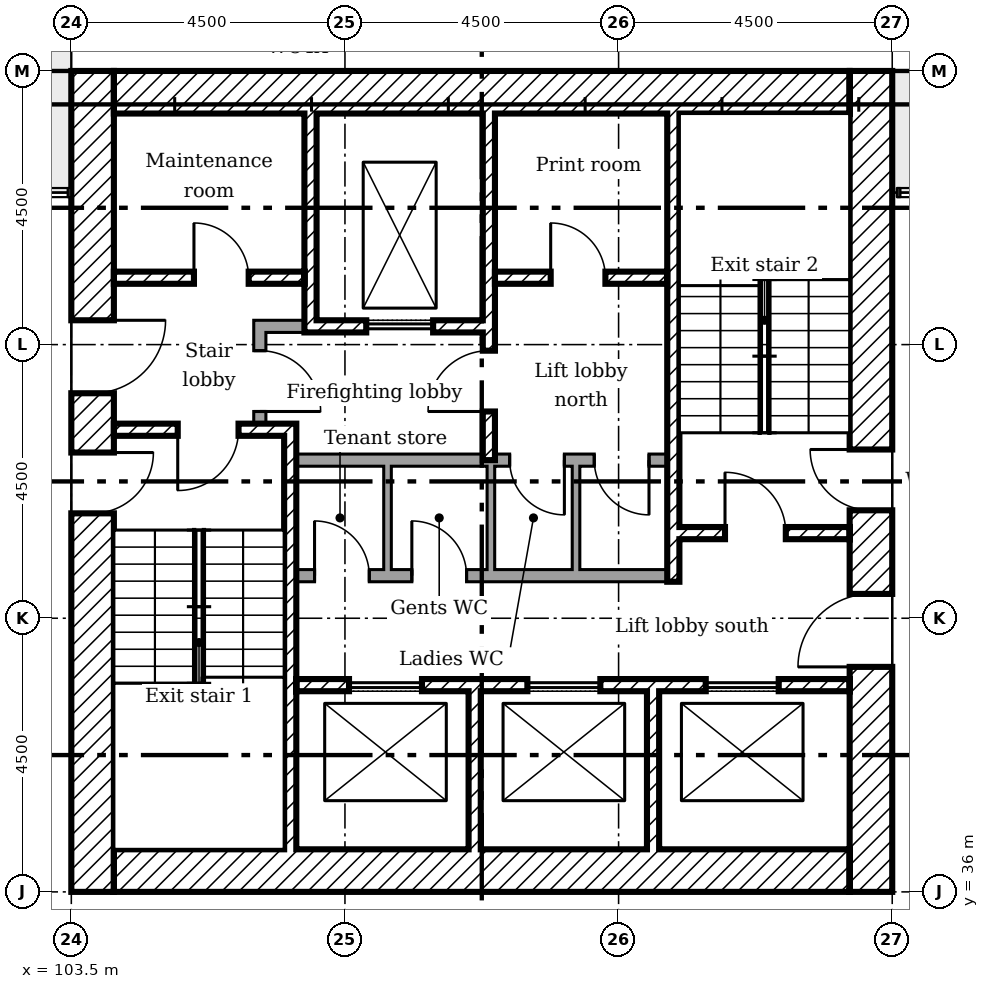
"""IFC4 building model, lengths in metres.
Left out: names, types, materials, properties, quantities, classifications, styles, units other than length and angle.
Written with IfcOpenShell. Run it as: python <this file> out.ifc"""

import sys

from ifc_helpers import new_model, si_unit, direction, frame, frame_2d, origin, place, context, subcontext, project, spatial, rectangle, extrude, element, fill, save


model = new_model("IFC4")
c1 = context("Model", 3, precision=1e-05, world=origin(), true_north=direction((0.0, 1.0)))
c2 = subcontext(c1, "Body", "Model", "MODEL_VIEW")
j1 = project(units=[si_unit("LENGTHUNIT", "METRE"), si_unit("PLANEANGLEUNIT", "RADIAN")], contexts=[c1])
p1 = place(None, origin())
s1 = spatial("IfcSite", under=j1, at=p1, CompositionType="ELEMENT")
p2 = place(p1, origin())
s2 = spatial("IfcBuilding", under=s1, at=p2, CompositionType="ELEMENT")
p3 = place(p2, frame((0.0, 0.0, 102.8)))
s3 = spatial("IfcBuildingStorey", under=s2, at=p3, CompositionType="ELEMENT", Elevation=102.8)
p4 = place(p3, frame((116.65, 36.0, 0.0), z_axis=(0.0, 0.0, 1.0), x_axis=(0.0, 1.0, 0.0)))
e1 = element("IfcWall", 1, at=p4, inside=s3, PredefinedType="SHEAR", context=c2, shape_type="SweptSolid", body=[
    extrude(rectangle(XDim=13.5, YDim=0.7, at=frame_2d((6.75, 0.0))), origin(), (0.0, 0.0, 1.0), 3.35),
])
p5 = place(p4, frame((3.7, 0.0, 0.0)))
e2 = element("IfcOpeningElement", 2, at=p5, cuts=e1, PredefinedType="OPENING", context=c2, shape_type="SweptSolid", body=[
    extrude(rectangle(XDim=1.2, YDim=2.1, at=frame_2d((0.6, 1.05))), frame((0.0, 0.36, 0.0), z_axis=(0.0, -1.0, 0.0), x_axis=(1.0, 0.0, 0.0)), (0.0, 0.0, 1.0), 0.72),
])
p6 = place(p4, frame((6.275, 0.0, 0.0)))
e3 = element("IfcOpeningElement", 3, at=p6, cuts=e1, PredefinedType="OPENING", context=c2, shape_type="SweptSolid", body=[
    extrude(rectangle(XDim=1.0, YDim=2.1, at=frame_2d((0.5, 1.05))), frame((0.0, 0.36, 0.0), z_axis=(0.0, -1.0, 0.0), x_axis=(1.0, 0.0, 0.0)), (0.0, 0.0, 1.0), 0.72),
])
for number, where in (
    (4, (104.2, 49.15, 0.0)),
    (5, (104.2, 36.35, 0.0)),
):
    element("IfcWall", number, at=place(p3, frame(where)), inside=s3, PredefinedType="SHEAR", context=c2, shape_type="SweptSolid", body=[
        extrude(rectangle(XDim=12.1, YDim=0.7, at=frame_2d((6.05, 0.0))), origin(), (0.0, 0.0, 1.0), 3.35),
    ])
p7 = place(p3, frame((103.85, 36.0, 0.0), z_axis=(0.0, 0.0, 1.0), x_axis=(0.0, 1.0, 0.0)))
e6 = element("IfcWall", 6, at=p7, inside=s3, PredefinedType="SHEAR", context=c2, shape_type="SweptSolid", body=[
    extrude(rectangle(XDim=13.5, YDim=0.7, at=frame_2d((6.75, 0.0))), origin(), (0.0, 0.0, 1.0), 3.35),
])
p8 = place(p7, frame((8.2, 0.0, 0.0)))
e7 = element("IfcOpeningElement", 7, at=p8, cuts=e6, PredefinedType="OPENING", context=c2, shape_type="SweptSolid", body=[
    extrude(rectangle(XDim=1.2, YDim=2.1, at=frame_2d((0.6, 1.05))), frame((0.0, 0.36, 0.0), z_axis=(0.0, -1.0, 0.0), x_axis=(1.0, 0.0, 0.0)), (0.0, 0.0, 1.0), 0.72),
])
p9 = place(p7, frame((6.225, 0.0, 0.0)))
e8 = element("IfcOpeningElement", 8, at=p9, cuts=e6, PredefinedType="OPENING", context=c2, shape_type="SweptSolid", body=[
    extrude(rectangle(XDim=1.0, YDim=2.1, at=frame_2d((0.5, 1.05))), frame((0.0, 0.36, 0.0), z_axis=(0.0, -1.0, 0.0), x_axis=(1.0, 0.0, 0.0)), (0.0, 0.0, 1.0), 0.72),
])
p10 = place(p3, frame((107.433, 48.8, 0.0), z_axis=(0.0, 0.0, 1.0), x_axis=(0.0, -1.0, 0.0)))
e9 = element("IfcWall", 9, at=p10, inside=s3, PredefinedType="SHEAR", context=c2, shape_type="SweptSolid", body=[
    extrude(rectangle(XDim=3.6, YDim=0.2, at=frame_2d((1.8, 0.0))), origin(), (0.0, 0.0, 1.0), 3.35),
])
p11 = place(p3, frame((110.367, 48.8, 0.0), z_axis=(0.0, 0.0, 1.0), x_axis=(0.0, -1.0, 0.0)))
e10 = element("IfcWall", 10, at=p11, inside=s3, PredefinedType="SHEAR", context=c2, shape_type="SweptSolid", body=[
    extrude(rectangle(XDim=5.7, YDim=0.2, at=frame_2d((2.85, 0.0))), origin(), (0.0, 0.0, 1.0), 3.35),
])
p12 = place(p11, frame((3.9, 0.0, 0.0)))
e11 = element("IfcOpeningElement", 11, at=p12, cuts=e10, PredefinedType="OPENING", context=c2, shape_type="SweptSolid", body=[
    extrude(rectangle(XDim=1.0, YDim=2.1, at=frame_2d((0.5, 1.05))), frame((0.0, 0.11, 0.0), z_axis=(0.0, -1.0, 0.0), x_axis=(1.0, 0.0, 0.0)), (0.0, 0.0, 1.0), 0.22),
])
for number, where, z_axis, x_axis in (
    (12, (110.133, 36.7, 0.0), (0.0, 0.0, 1.0), (0.0, 1.0, 0.0)),
    (13, (113.067, 36.7, 0.0), (0.0, 0.0, 1.0), (0.0, 1.0, 0.0)),
):
    element("IfcWall", number, at=place(p3, frame(where, z_axis=z_axis, x_axis=x_axis)), inside=s3, PredefinedType="SHEAR", context=c2, shape_type="SweptSolid", body=[
        extrude(rectangle(XDim=2.6, YDim=0.2, at=frame_2d((1.3, 0.0))), origin(), (0.0, 0.0, 1.0), 3.35),
    ])
p13 = place(p3, frame((106.5, 45.3, 0.0)))
e14 = element("IfcWall", 14, at=p13, inside=s3, PredefinedType="PARTITIONING", context=c2, shape_type="SweptSolid", body=[
    extrude(rectangle(XDim=0.833, YDim=0.2, at=frame_2d((0.417, 0.0))), origin(), (0.0, 0.0, 1.0), 3.35),
])
p14 = place(p3, frame((106.6, 43.7, 0.0), z_axis=(0.0, 0.0, 1.0), x_axis=(0.0, 1.0, 0.0)))
e15 = element("IfcWall", 15, at=p14, inside=s3, PredefinedType="PARTITIONING", context=c2, shape_type="SweptSolid", body=[
    extrude(rectangle(XDim=1.5, YDim=0.2, at=frame_2d((0.75, 0.0))), origin(), (0.0, 0.0, 1.0), 3.35),
])
p15 = place(p14, frame((0.2, 0.0, 0.0)))
e16 = element("IfcOpeningElement", 16, at=p15, cuts=e15, PredefinedType="OPENING", context=c2, shape_type="SweptSolid", body=[
    extrude(rectangle(XDim=1.0, YDim=2.1, at=frame_2d((0.5, 1.05))), frame((0.0, 0.11, 0.0), z_axis=(0.0, -1.0, 0.0), x_axis=(1.0, 0.0, 0.0)), (0.0, 0.0, 1.0), 0.22),
])
p16 = place(p3, frame((104.2, 46.1, 0.0)))
e17 = element("IfcWall", 17, at=p16, inside=s3, PredefinedType="SHEAR", context=c2, shape_type="SweptSolid", body=[
    extrude(rectangle(XDim=3.133, YDim=0.2, at=frame_2d((1.567, 0.0))), origin(), (0.0, 0.0, 1.0), 3.35),
])
p17 = place(p16, frame((1.317, 0.0, 0.0)))
e18 = element("IfcOpeningElement", 18, at=p17, cuts=e17, PredefinedType="OPENING", context=c2, shape_type="SweptSolid", body=[
    extrude(rectangle(XDim=0.9, YDim=2.1, at=frame_2d((0.45, 1.05))), frame((0.0, 0.11, 0.0), z_axis=(0.0, -1.0, 0.0), x_axis=(1.0, 0.0, 0.0)), (0.0, 0.0, 1.0), 0.22),
])
p18 = place(p3, frame((110.467, 46.1, 0.0)))
e19 = element("IfcWall", 19, at=p18, inside=s3, PredefinedType="SHEAR", context=c2, shape_type="SweptSolid", body=[
    extrude(rectangle(XDim=2.833, YDim=0.2, at=frame_2d((1.417, 0.0))), origin(), (0.0, 0.0, 1.0), 3.35),
])
p19 = place(p18, frame((0.917, 0.0, 0.0)))
e20 = element("IfcOpeningElement", 20, at=p19, cuts=e19, PredefinedType="OPENING", context=c2, shape_type="SweptSolid", body=[
    extrude(rectangle(XDim=0.9, YDim=2.1, at=frame_2d((0.45, 1.05))), frame((0.0, 0.11, 0.0), z_axis=(0.0, -1.0, 0.0), x_axis=(1.0, 0.0, 0.0)), (0.0, 0.0, 1.0), 0.22),
])
p20 = place(p3, frame((107.533, 45.3, 0.0)))
e21 = element("IfcWall", 21, at=p20, inside=s3, PredefinedType="SHEAR", context=c2, shape_type="SweptSolid", body=[
    extrude(rectangle(XDim=2.733, YDim=0.2, at=frame_2d((1.367, 0.0))), origin(), (0.0, 0.0, 1.0), 3.35),
])
p21 = place(p20, frame((0.817, 0.0, 0.0)))
e22 = element("IfcOpeningElement", 22, at=p21, cuts=e21, PredefinedType="OPENING", context=c2, shape_type="SweptSolid", body=[
    extrude(rectangle(XDim=1.1, YDim=2.1, at=frame_2d((0.55, 1.05))), frame((0.0, 0.11, 0.0), z_axis=(0.0, -1.0, 0.0), x_axis=(1.0, 0.0, 0.0)), (0.0, 0.0, 1.0), 0.22),
])
p22 = place(p3, frame((107.2, 39.4, 0.0)))
e23 = element("IfcWall", 23, at=p22, inside=s3, PredefinedType="SHEAR", context=c2, shape_type="SweptSolid", body=[
    extrude(rectangle(XDim=9.1, YDim=0.2, at=frame_2d((4.55, 0.0))), origin(), (0.0, 0.0, 1.0), 3.35),
])
p23 = place(p22, frame((0.867, 0.0, 0.0)))
e24 = element("IfcOpeningElement", 24, at=p23, cuts=e23, PredefinedType="OPENING", context=c2, shape_type="SweptSolid", body=[
    extrude(rectangle(XDim=1.2, YDim=2.1, at=frame_2d((0.6, 1.05))), frame((0.0, 0.11, 0.0), z_axis=(0.0, -1.0, 0.0), x_axis=(1.0, 0.0, 0.0)), (0.0, 0.0, 1.0), 0.22),
])
p24 = place(p22, frame((3.8, 0.0, 0.0)))
e25 = element("IfcOpeningElement", 25, at=p24, cuts=e23, PredefinedType="OPENING", context=c2, shape_type="SweptSolid", body=[
    extrude(rectangle(XDim=1.2, YDim=2.1, at=frame_2d((0.6, 1.05))), frame((0.0, 0.11, 0.0), z_axis=(0.0, -1.0, 0.0), x_axis=(1.0, 0.0, 0.0)), (0.0, 0.0, 1.0), 0.22),
])
p25 = place(p22, frame((6.733, 0.0, 0.0)))
e26 = element("IfcOpeningElement", 26, at=p25, cuts=e23, PredefinedType="OPENING", context=c2, shape_type="SweptSolid", body=[
    extrude(rectangle(XDim=1.2, YDim=2.1, at=frame_2d((0.6, 1.05))), frame((0.0, 0.11, 0.0), z_axis=(0.0, -1.0, 0.0), x_axis=(1.0, 0.0, 0.0)), (0.0, 0.0, 1.0), 0.22),
])
p26 = place(p3, frame((107.1, 36.7, 0.0), z_axis=(0.0, 0.0, 1.0), x_axis=(0.0, 1.0, 0.0)))
e27 = element("IfcWall", 27, at=p26, inside=s3, PredefinedType="SHEAR", context=c2, shape_type="SweptSolid", body=[
    extrude(rectangle(XDim=7.0, YDim=0.2, at=frame_2d((3.5, 0.0))), origin(), (0.0, 0.0, 1.0), 3.35),
])
p27 = place(p3, frame((104.2, 43.6, 0.0)))
e28 = element("IfcWall", 28, at=p27, inside=s3, PredefinedType="SHEAR", context=c2, shape_type="SweptSolid", body=[
    extrude(rectangle(XDim=2.8, YDim=0.2, at=frame_2d((1.4, 0.0))), origin(), (0.0, 0.0, 1.0), 3.35),
])
p28 = place(p27, frame((1.05, 0.0, 0.0)))
e29 = element("IfcOpeningElement", 29, at=p28, cuts=e28, PredefinedType="OPENING", context=c2, shape_type="SweptSolid", body=[
    extrude(rectangle(XDim=1.0, YDim=2.1, at=frame_2d((0.5, 1.05))), frame((0.0, 0.11, 0.0), z_axis=(0.0, -1.0, 0.0), x_axis=(1.0, 0.0, 0.0)), (0.0, 0.0, 1.0), 0.22),
])
p29 = place(p3, frame((113.5, 41.9, 0.0)))
e30 = element("IfcWall", 30, at=p29, inside=s3, PredefinedType="SHEAR", context=c2, shape_type="SweptSolid", body=[
    extrude(rectangle(XDim=2.8, YDim=0.2, at=frame_2d((1.4, 0.0))), origin(), (0.0, 0.0, 1.0), 3.35),
])
p30 = place(p29, frame((0.75, 0.0, 0.0)))
e31 = element("IfcOpeningElement", 31, at=p30, cuts=e30, PredefinedType="OPENING", context=c2, shape_type="SweptSolid", body=[
    extrude(rectangle(XDim=1.0, YDim=2.1, at=frame_2d((0.5, 1.05))), frame((0.0, 0.11, 0.0), z_axis=(0.0, -1.0, 0.0), x_axis=(1.0, 0.0, 0.0)), (0.0, 0.0, 1.0), 0.22),
])
p31 = place(p3, frame((113.4, 41.1, 0.0), z_axis=(0.0, 0.0, 1.0), x_axis=(0.0, 1.0, 0.0)))
e32 = element("IfcWall", 32, at=p31, inside=s3, PredefinedType="SHEAR", context=c2, shape_type="SweptSolid", body=[
    extrude(rectangle(XDim=7.7, YDim=0.2, at=frame_2d((3.85, 0.0))), origin(), (0.0, 0.0, 1.0), 3.35),
])
p32 = place(p3, frame((107.2, 43.1, 0.0)))
e33 = element("IfcWall", 33, at=p32, inside=s3, PredefinedType="PARTITIONING", context=c2, shape_type="SweptSolid", body=[
    extrude(rectangle(XDim=6.1, YDim=0.2, at=frame_2d((3.05, 0.0))), origin(), (0.0, 0.0, 1.0), 3.35),
])
p33 = place(p32, frame((3.509, 0.0, 0.0)))
e34 = element("IfcOpeningElement", 34, at=p33, cuts=e33, PredefinedType="OPENING", context=c2, shape_type="SweptSolid", body=[
    extrude(rectangle(XDim=0.9, YDim=2.1, at=frame_2d((0.45, 1.05))), frame((0.0, 0.11, 0.0), z_axis=(0.0, -1.0, 0.0), x_axis=(1.0, 0.0, 0.0)), (0.0, 0.0, 1.0), 0.22),
])
p34 = place(p32, frame((4.9, 0.0, 0.0)))
e35 = element("IfcOpeningElement", 35, at=p34, cuts=e33, PredefinedType="OPENING", context=c2, shape_type="SweptSolid", body=[
    extrude(rectangle(XDim=0.9, YDim=2.1, at=frame_2d((0.45, 1.05))), frame((0.0, 0.11, 0.0), z_axis=(0.0, -1.0, 0.0), x_axis=(1.0, 0.0, 0.0)), (0.0, 0.0, 1.0), 0.22),
])
p35 = place(p3, frame((107.2, 41.2, 0.0)))
e36 = element("IfcWall", 36, at=p35, inside=s3, PredefinedType="PARTITIONING", context=c2, shape_type="SweptSolid", body=[
    extrude(rectangle(XDim=6.1, YDim=0.2, at=frame_2d((3.05, 0.0))), origin(), (0.0, 0.0, 1.0), 3.35),
])
p36 = place(p35, frame((0.3, 0.0, 0.0)))
e37 = element("IfcOpeningElement", 37, at=p36, cuts=e36, PredefinedType="OPENING", context=c2, shape_type="SweptSolid", body=[
    extrude(rectangle(XDim=0.9, YDim=2.1, at=frame_2d((0.45, 1.05))), frame((0.0, 0.11, 0.0), z_axis=(0.0, -1.0, 0.0), x_axis=(1.0, 0.0, 0.0)), (0.0, 0.0, 1.0), 0.22),
])
p37 = place(p35, frame((1.9, 0.0, 0.0)))
e38 = element("IfcOpeningElement", 38, at=p37, cuts=e36, PredefinedType="OPENING", context=c2, shape_type="SweptSolid", body=[
    extrude(rectangle(XDim=0.9, YDim=2.1, at=frame_2d((0.45, 1.05))), frame((0.0, 0.11, 0.0), z_axis=(0.0, -1.0, 0.0), x_axis=(1.0, 0.0, 0.0)), (0.0, 0.0, 1.0), 0.22),
])
for number, where, z_axis, x_axis in (
    (39, (108.7, 41.3, 0.0), (0.0, 0.0, 1.0), (0.0, 1.0, 0.0)),
    (40, (110.4, 41.3, 0.0), (0.0, 0.0, 1.0), (0.0, 1.0, 0.0)),
    (41, (111.8, 41.3, 0.0), (0.0, 0.0, 1.0), (0.0, 1.0, 0.0)),
):
    element("IfcWall", number, at=place(p3, frame(where, z_axis=z_axis, x_axis=x_axis)), inside=s3, PredefinedType="PARTITIONING", context=c2, shape_type="SweptSolid", body=[
        extrude(rectangle(XDim=1.7, YDim=0.125, at=frame_2d((0.85, 0.0))), origin(), (0.0, 0.0, 1.0), 3.35),
    ])
p38 = place(p8, frame((1.2, 0.0, 0.0), x_axis=(-1.0, 0.0, 0.0)))
e42 = element("IfcDoor", 42, at=p38, inside=s3, OperationType="SINGLE_SWING_RIGHT", PredefinedType="DOOR", context=c2, shape_type="SweptSolid", body=[
    extrude(rectangle(XDim=1.2, YDim=2.1, at=frame_2d((0.6, 1.05))), frame((0.0, 0.025, 0.0), z_axis=(0.0, -1.0, 0.0), x_axis=(1.0, 0.0, 0.0)), (0.0, 0.0, 1.0), 0.05),
])
fill(e7, e42)
p39 = place(p5, origin())
e43 = element("IfcDoor", 43, at=p39, inside=s3, OperationType="SINGLE_SWING_RIGHT", PredefinedType="DOOR", context=c2, shape_type="SweptSolid", body=[
    extrude(rectangle(XDim=1.2, YDim=2.1, at=frame_2d((0.6, 1.05))), frame((0.0, 0.025, 0.0), z_axis=(0.0, -1.0, 0.0), x_axis=(1.0, 0.0, 0.0)), (0.0, 0.0, 1.0), 0.05),
])
fill(e2, e43)
p40 = place(p28, frame((1.0, 0.0, 0.0), x_axis=(-1.0, 0.0, 0.0)))
e44 = element("IfcDoor", 44, at=p40, inside=s3, OperationType="SINGLE_SWING_LEFT", PredefinedType="DOOR", context=c2, shape_type="SweptSolid", body=[
    extrude(rectangle(XDim=1.0, YDim=2.1, at=frame_2d((0.5, 1.05))), frame((0.0, 0.025, 0.0), z_axis=(0.0, -1.0, 0.0), x_axis=(1.0, 0.0, 0.0)), (0.0, 0.0, 1.0), 0.05),
])
fill(e29, e44)
p41 = place(p9, frame((1.0, 0.0, 0.0), x_axis=(-1.0, 0.0, 0.0)))
e45 = element("IfcDoor", 45, at=p41, inside=s3, OperationType="SINGLE_SWING_RIGHT", PredefinedType="DOOR", context=c2, shape_type="SweptSolid", body=[
    extrude(rectangle(XDim=1.0, YDim=2.1, at=frame_2d((0.5, 1.05))), frame((0.0, 0.025, 0.0), z_axis=(0.0, -1.0, 0.0), x_axis=(1.0, 0.0, 0.0)), (0.0, 0.0, 1.0), 0.05),
])
fill(e8, e45)
p42 = place(p30, origin())
e46 = element("IfcDoor", 46, at=p42, inside=s3, OperationType="SINGLE_SWING_RIGHT", PredefinedType="DOOR", context=c2, shape_type="SweptSolid", body=[
    extrude(rectangle(XDim=1.0, YDim=2.1, at=frame_2d((0.5, 1.05))), frame((0.0, 0.025, 0.0), z_axis=(0.0, -1.0, 0.0), x_axis=(1.0, 0.0, 0.0)), (0.0, 0.0, 1.0), 0.05),
])
fill(e31, e46)
p43 = place(p6, origin())
e47 = element("IfcDoor", 47, at=p43, inside=s3, OperationType="SINGLE_SWING_LEFT", PredefinedType="DOOR", context=c2, shape_type="SweptSolid", body=[
    extrude(rectangle(XDim=1.0, YDim=2.1, at=frame_2d((0.5, 1.05))), frame((0.0, 0.025, 0.0), z_axis=(0.0, -1.0, 0.0), x_axis=(1.0, 0.0, 0.0)), (0.0, 0.0, 1.0), 0.05),
])
fill(e3, e47)
p44 = place(p12, frame((1.0, 0.0, 0.0), x_axis=(-1.0, 0.0, 0.0)))
e48 = element("IfcDoor", 48, at=p44, inside=s3, OperationType="SINGLE_SWING_RIGHT", PredefinedType="DOOR", context=c2, shape_type="SweptSolid", body=[
    extrude(rectangle(XDim=1.0, YDim=2.1, at=frame_2d((0.5, 1.05))), frame((0.0, 0.025, 0.0), z_axis=(0.0, -1.0, 0.0), x_axis=(1.0, 0.0, 0.0)), (0.0, 0.0, 1.0), 0.05),
])
fill(e11, e48)
p45 = place(p15, frame((1.0, 0.0, 0.0), x_axis=(-1.0, 0.0, 0.0)))
e49 = element("IfcDoor", 49, at=p45, inside=s3, OperationType="SINGLE_SWING_LEFT", PredefinedType="DOOR", context=c2, shape_type="SweptSolid", body=[
    extrude(rectangle(XDim=1.0, YDim=2.1, at=frame_2d((0.5, 1.05))), frame((0.0, 0.025, 0.0), z_axis=(0.0, -1.0, 0.0), x_axis=(1.0, 0.0, 0.0)), (0.0, 0.0, 1.0), 0.05),
])
fill(e16, e49)
p46 = place(p17, origin())
e50 = element("IfcDoor", 50, at=p46, inside=s3, OperationType="SINGLE_SWING_RIGHT", PredefinedType="DOOR", context=c2, shape_type="SweptSolid", body=[
    extrude(rectangle(XDim=0.9, YDim=2.1, at=frame_2d((0.45, 1.05))), frame((0.0, 0.025, 0.0), z_axis=(0.0, -1.0, 0.0), x_axis=(1.0, 0.0, 0.0)), (0.0, 0.0, 1.0), 0.05),
])
fill(e18, e50)
p47 = place(p19, origin())
e51 = element("IfcDoor", 51, at=p47, inside=s3, OperationType="SINGLE_SWING_RIGHT", PredefinedType="DOOR", context=c2, shape_type="SweptSolid", body=[
    extrude(rectangle(XDim=0.9, YDim=2.1, at=frame_2d((0.45, 1.05))), frame((0.0, 0.025, 0.0), z_axis=(0.0, -1.0, 0.0), x_axis=(1.0, 0.0, 0.0)), (0.0, 0.0, 1.0), 0.05),
])
fill(e20, e51)
p48 = place(p36, origin())
e52 = element("IfcDoor", 52, at=p48, inside=s3, OperationType="SINGLE_SWING_RIGHT", PredefinedType="DOOR", context=c2, shape_type="SweptSolid", body=[
    extrude(rectangle(XDim=0.9, YDim=2.1, at=frame_2d((0.45, 1.05))), frame((0.0, 0.025, 0.0), z_axis=(0.0, -1.0, 0.0), x_axis=(1.0, 0.0, 0.0)), (0.0, 0.0, 1.0), 0.05),
])
fill(e37, e52)
p49 = place(p37, origin())
e53 = element("IfcDoor", 53, at=p49, inside=s3, OperationType="SINGLE_SWING_RIGHT", PredefinedType="DOOR", context=c2, shape_type="SweptSolid", body=[
    extrude(rectangle(XDim=0.9, YDim=2.1, at=frame_2d((0.45, 1.05))), frame((0.0, 0.025, 0.0), z_axis=(0.0, -1.0, 0.0), x_axis=(1.0, 0.0, 0.0)), (0.0, 0.0, 1.0), 0.05),
])
fill(e38, e53)
p50 = place(p33, frame((0.9, 0.0, 0.0), x_axis=(-1.0, 0.0, 0.0)))
e54 = element("IfcDoor", 54, at=p50, inside=s3, OperationType="SINGLE_SWING_RIGHT", PredefinedType="DOOR", context=c2, shape_type="SweptSolid", body=[
    extrude(rectangle(XDim=0.9, YDim=2.1, at=frame_2d((0.45, 1.05))), frame((0.0, 0.025, 0.0), z_axis=(0.0, -1.0, 0.0), x_axis=(1.0, 0.0, 0.0)), (0.0, 0.0, 1.0), 0.05),
])
fill(e34, e54)
p51 = place(p34, frame((0.9, 0.0, 0.0), x_axis=(-1.0, 0.0, 0.0)))
e55 = element("IfcDoor", 55, at=p51, inside=s3, OperationType="SINGLE_SWING_RIGHT", PredefinedType="DOOR", context=c2, shape_type="SweptSolid", body=[
    extrude(rectangle(XDim=0.9, YDim=2.1, at=frame_2d((0.45, 1.05))), frame((0.0, 0.025, 0.0), z_axis=(0.0, -1.0, 0.0), x_axis=(1.0, 0.0, 0.0)), (0.0, 0.0, 1.0), 0.05),
])
fill(e35, e55)
p52 = place(p21, origin())
e56 = element("IfcDoor", 56, at=p52, inside=s3, OperationType="SLIDING_TO_LEFT", PredefinedType="DOOR", context=c2, shape_type="SweptSolid", body=[
    extrude(rectangle(XDim=1.1, YDim=2.1, at=frame_2d((0.55, 1.05))), frame((0.0, 0.025, 0.0), z_axis=(0.0, -1.0, 0.0), x_axis=(1.0, 0.0, 0.0)), (0.0, 0.0, 1.0), 0.05),
])
fill(e22, e56)
p53 = place(p23, origin())
e57 = element("IfcDoor", 57, at=p53, inside=s3, OperationType="SLIDING_TO_LEFT", PredefinedType="DOOR", context=c2, shape_type="SweptSolid", body=[
    extrude(rectangle(XDim=1.2, YDim=2.1, at=frame_2d((0.6, 1.05))), frame((0.0, 0.025, 0.0), z_axis=(0.0, -1.0, 0.0), x_axis=(1.0, 0.0, 0.0)), (0.0, 0.0, 1.0), 0.05),
])
fill(e24, e57)
p54 = place(p24, origin())
e58 = element("IfcDoor", 58, at=p54, inside=s3, OperationType="SLIDING_TO_LEFT", PredefinedType="DOOR", context=c2, shape_type="SweptSolid", body=[
    extrude(rectangle(XDim=1.2, YDim=2.1, at=frame_2d((0.6, 1.05))), frame((0.0, 0.025, 0.0), z_axis=(0.0, -1.0, 0.0), x_axis=(1.0, 0.0, 0.0)), (0.0, 0.0, 1.0), 0.05),
])
fill(e25, e58)
p55 = place(p25, origin())
e59 = element("IfcDoor", 59, at=p55, inside=s3, OperationType="SLIDING_TO_LEFT", PredefinedType="DOOR", context=c2, shape_type="SweptSolid", body=[
    extrude(rectangle(XDim=1.2, YDim=2.1, at=frame_2d((0.6, 1.05))), frame((0.0, 0.025, 0.0), z_axis=(0.0, -1.0, 0.0), x_axis=(1.0, 0.0, 0.0)), (0.0, 0.0, 1.0), 0.05),
])
fill(e26, e59)
save(model, sys.argv[1])
